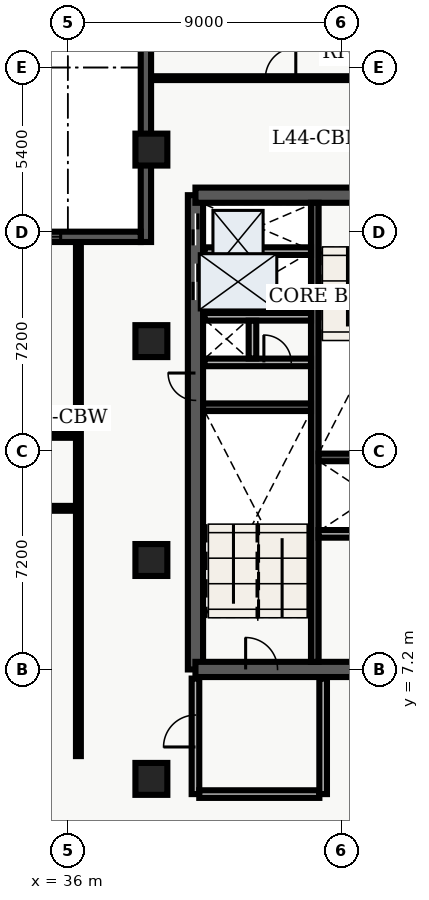
"""IFC4 building model, lengths in metres.
Left out: names, types, materials, properties, quantities, classifications, styles, units other than length and angle.
Written with IfcOpenShell. Run it as: python <this file> out.ifc"""

import sys

from ifc_helpers import new_model, entity, si_unit, converted_unit, direction, frame, origin_with_axes, origin_2d_with_axis, place, context, subcontext, project, spatial, polyline, rectangle, outline, extrude, element, fill, save


model = new_model("IFC4")
c1 = context("Model", 3, precision=1e-05, world=origin_with_axes(), true_north=direction((0.0, 1.0)))
c2 = subcontext(c1, "Body", "Model", "MODEL_VIEW")
j1 = project(units=[si_unit("LENGTHUNIT", "METRE"), converted_unit("PLANEANGLEUNIT", "DEGREE", entity("IfcPlaneAngleMeasure", 0.017), si_unit("PLANEANGLEUNIT", "RADIAN"), dimensions=[0, 0, 0, 0, 0, 0, 0])], contexts=[c1])
p1 = place(None, origin_with_axes())
s1 = spatial("IfcSite", under=j1, at=p1, CompositionType="ELEMENT")
p2 = place(p1, origin_with_axes())
s2 = spatial("IfcBuilding", under=s1, at=p2, CompositionType="ELEMENT")
p3 = place(p2, frame((0.0, 0.0, 179.7), z_axis=(0.0, 0.0, 1.0), x_axis=(1.0, 0.0, 0.0)))
s3 = spatial("IfcBuildingStorey", under=s2, at=p3, CompositionType="ELEMENT", Elevation=179.7)
p4 = place(p3, frame((40.2, 7.2, 0.0), z_axis=(0.0, 0.0, 1.0), x_axis=(0.0, 1.0, 0.0)))
e1 = element("IfcWall", 1, at=p4, inside=s3, PredefinedType="SHEAR", context=c2, shape_type="SweptSolid", body=[
    extrude(outline(polyline([(0.0, -0.25), (15.6, -0.25), (15.6, 0.25), (0.0, 0.25), (0.0, -0.25)])), origin_with_axes(), (0.0, 0.0, 1.0), 3.66),
])
p5 = place(p4, frame((14.475, 0.0, 0.0), z_axis=(0.0, 0.0, 1.0), x_axis=(1.0, 0.0, 0.0)))
e2 = element("IfcOpeningElement", 2, at=p5, cuts=e1, PredefinedType="OPENING", context=c2, shape_type="SweptSolid", body=[
    extrude(rectangle(XDim=1.05, YDim=0.52, at=origin_2d_with_axis()), origin_with_axes(), (0.0, 0.0, 1.0), 2.15),
])
p6 = place(p4, frame((12.75, 0.0, 0.0), z_axis=(0.0, 0.0, 1.0), x_axis=(1.0, 0.0, 0.0)))
e3 = element("IfcOpeningElement", 3, at=p6, cuts=e1, PredefinedType="OPENING", context=c2, shape_type="SweptSolid", body=[
    extrude(rectangle(XDim=1.2, YDim=0.52, at=origin_2d_with_axis()), origin_with_axes(), (0.0, 0.0, 1.0), 2.15),
])
p7 = place(p4, frame((9.3, 0.0, 0.0), z_axis=(0.0, 0.0, 1.0), x_axis=(1.0, 0.0, 0.0)))
e4 = element("IfcOpeningElement", 4, at=p7, cuts=e1, PredefinedType="OPENING", context=c2, shape_type="SweptSolid", body=[
    extrude(rectangle(XDim=0.9, YDim=0.52, at=origin_2d_with_axis()), origin_with_axes(), (0.0, 0.0, 1.0), 2.15),
])
p8 = place(p3, frame((40.2, 7.2, 0.0), z_axis=(0.0, 0.0, 1.0), x_axis=(1.0, 0.0, 0.0)))
e5 = element("IfcWall", 5, at=p8, inside=s3, PredefinedType="SHEAR", context=c2, shape_type="SweptSolid", body=[
    extrude(outline(polyline([(0.0, -0.25), (7.85, -0.25), (7.85, 0.25), (0.0, 0.25), (0.0, -0.25)])), origin_with_axes(), (0.0, 0.0, 1.0), 3.66),
])
p9 = place(p8, frame((2.175, 0.0, 0.0), z_axis=(0.0, 0.0, 1.0), x_axis=(1.0, 0.0, 0.0)))
e6 = element("IfcOpeningElement", 6, at=p9, cuts=e5, PredefinedType="OPENING", context=c2, shape_type="SweptSolid", body=[
    extrude(rectangle(XDim=1.05, YDim=0.52, at=origin_2d_with_axis()), origin_with_axes(), (0.0, 0.0, 1.0), 2.15),
])
p10 = place(p3, frame((40.2, 22.8, 0.0), z_axis=(0.0, 0.0, 1.0), x_axis=(1.0, 0.0, 0.0)))
e7 = element("IfcWall", 7, at=p10, inside=s3, PredefinedType="SHEAR", context=c2, shape_type="SweptSolid", body=[
    extrude(outline(polyline([(0.0, -0.25), (7.85, -0.25), (7.85, 0.25), (0.0, 0.25), (0.0, -0.25)])), origin_with_axes(), (0.0, 0.0, 1.0), 3.66),
])
p11 = place(p10, frame((5.775, 0.0, 0.0), z_axis=(0.0, 0.0, 1.0), x_axis=(1.0, 0.0, 0.0)))
e8 = element("IfcOpeningElement", 8, at=p11, cuts=e7, PredefinedType="OPENING", context=c2, shape_type="SweptSolid", body=[
    extrude(rectangle(XDim=1.05, YDim=0.52, at=origin_2d_with_axis()), origin_with_axes(), (0.0, 0.0, 1.0), 2.15),
])
p12 = place(p3, frame((44.125, 7.45, 0.0), z_axis=(0.0, 0.0, 1.0), x_axis=(0.0, 1.0, 0.0)))
e9 = element("IfcWall", 9, at=p12, inside=s3, PredefinedType="SHEAR", context=c2, shape_type="SweptSolid", body=[
    extrude(outline(polyline([(0.0, -0.125), (15.1, -0.125), (15.1, 0.125), (0.0, 0.125), (0.0, -0.125)])), origin_with_axes(), (0.0, 0.0, 1.0), 3.66),
])
for number, where, z_axis, x_axis in (
    (10, (40.45, 15.825, 0.0), (0.0, 0.0, 1.0), (1.0, 0.0, 0.0)),
    (11, (44.25, 14.175, 0.0), (0.0, 0.0, 1.0), (1.0, 0.0, 0.0)),
):
    element("IfcWall", number, at=place(p3, frame(where, z_axis=z_axis, x_axis=x_axis)), inside=s3, PredefinedType="SHEAR", context=c2, shape_type="SweptSolid", body=[
        extrude(outline(polyline([(0.0, -0.125), (3.55, -0.125), (3.55, 0.125), (0.0, 0.125), (0.0, -0.125)])), origin_with_axes(), (0.0, 0.0, 1.0), 3.66),
    ])
p13 = place(p3, frame((40.5, 17.3, 0.0), z_axis=(0.0, 0.0, 1.0), x_axis=(1.0, 0.0, 0.0)))
e12 = element("IfcWall", 12, at=p13, inside=s3, PredefinedType="SOLIDWALL", context=c2, shape_type="SweptSolid", body=[
    extrude(outline(polyline([(0.0, -0.125), (3.5, -0.125), (3.5, 0.125), (0.0, 0.125), (0.0, -0.125)])), origin_with_axes(), (0.0, 0.0, 1.0), 2.7),
])
p14 = place(p13, frame((2.4, 0.0, 0.0), z_axis=(0.0, 0.0, 1.0), x_axis=(1.0, 0.0, 0.0)))
e13 = element("IfcOpeningElement", 13, at=p14, cuts=e12, PredefinedType="OPENING", context=c2, shape_type="SweptSolid", body=[
    extrude(rectangle(XDim=0.9, YDim=0.27, at=origin_2d_with_axis()), origin_with_axes(), (0.0, 0.0, 1.0), 2.15),
])
p15 = place(p3, frame((40.5, 18.8, 0.0), z_axis=(0.0, 0.0, 1.0), x_axis=(1.0, 0.0, 0.0)))
e14 = element("IfcWall", 14, at=p15, inside=s3, PredefinedType="SOLIDWALL", context=c2, shape_type="SweptSolid", body=[
    extrude(outline(polyline([(0.0, -0.125), (3.5, -0.125), (3.5, 0.125), (0.0, 0.125), (0.0, -0.125)])), origin_with_axes(), (0.0, 0.0, 1.0), 2.7),
])
p16 = place(p3, frame((42.075, 17.43, 0.0), z_axis=(0.0, 0.0, 1.0), x_axis=(0.0, 1.0, 0.0)))
e15 = element("IfcWall", 15, at=p16, inside=s3, PredefinedType="SOLIDWALL", context=c2, shape_type="SweptSolid", body=[
    extrude(outline(polyline([(0.0, -0.125), (1.24, -0.125), (1.24, 0.125), (0.0, 0.125), (0.0, -0.125)])), origin_with_axes(), (0.0, 0.0, 1.0), 2.7),
])
p17 = place(p3, frame((40.2, 3.1, 0.0), z_axis=(0.0, 0.0, 1.0), x_axis=(0.0, 1.0, 0.0)))
e16 = element("IfcWall", 16, at=p17, inside=s3, PredefinedType="SOLIDWALL", context=c2, shape_type="SweptSolid", body=[
    extrude(outline(polyline([(0.0, -0.125), (3.8, -0.125), (3.8, 0.125), (0.0, 0.125), (0.0, -0.125)])), origin_with_axes(), (0.0, 0.0, 1.0), 2.7),
])
p18 = place(p17, frame((2.075, 0.0, 0.0), z_axis=(0.0, 0.0, 1.0), x_axis=(1.0, 0.0, 0.0)))
e17 = element("IfcOpeningElement", 17, at=p18, cuts=e16, PredefinedType="OPENING", context=c2, shape_type="SweptSolid", body=[
    extrude(rectangle(XDim=1.05, YDim=0.27, at=origin_2d_with_axis()), origin_with_axes(), (0.0, 0.0, 1.0), 2.15),
])
p19 = place(p3, frame((40.325, 3.1, 0.0), z_axis=(0.0, 0.0, 1.0), x_axis=(1.0, 0.0, 0.0)))
e18 = element("IfcWall", 18, at=p19, inside=s3, PredefinedType="SOLIDWALL", context=c2, shape_type="SweptSolid", body=[
    extrude(outline(polyline([(0.0, -0.125), (3.95, -0.125), (3.95, 0.125), (0.0, 0.125), (0.0, -0.125)])), origin_with_axes(), (0.0, 0.0, 1.0), 2.7),
])
p20 = place(p3, frame((44.4, 3.1, 0.0), z_axis=(0.0, 0.0, 1.0), x_axis=(0.0, 1.0, 0.0)))
e19 = element("IfcWall", 19, at=p20, inside=s3, PredefinedType="SOLIDWALL", context=c2, shape_type="SweptSolid", body=[
    extrude(outline(polyline([(0.0, -0.125), (3.8, -0.125), (3.8, 0.125), (0.0, 0.125), (0.0, -0.125)])), origin_with_axes(), (0.0, 0.0, 1.0), 2.7),
])
for number, where, z_axis, x_axis in (
    (20, (38.75, 3.6, 0.0), (0.0, 0.0, 1.0), (1.0, 0.0, 0.0)),
    (21, (38.75, 10.8, 0.0), (0.0, 0.0, 1.0), (1.0, 0.0, 0.0)),
    (22, (38.75, 18.0, 0.0), (0.0, 0.0, 1.0), (1.0, 0.0, 0.0)),
    (23, (38.75, 24.3, 0.0), (0.0, 0.0, 1.0), (1.0, 0.0, 0.0)),
):
    element("IfcColumn", number, at=place(p3, frame(where, z_axis=z_axis, x_axis=x_axis)), inside=s3, PredefinedType="COLUMN", context=c2, shape_type="SweptSolid", body=[
        extrude(rectangle(XDim=1.05, YDim=1.05, at=origin_2d_with_axis()), origin_with_axes(), (0.0, 0.0, 1.0), 3.9),
    ])
for number, where, z_axis, x_axis in (
    (24, (40.5, 20.96, 0.0), (0.0, 0.0, 1.0), (1.0, 0.0, 0.0)),
    (25, (44.25, 11.66, 0.0), (0.0, 0.0, 1.0), (1.0, 0.0, 0.0)),
):
    element("IfcWall", number, at=place(p3, frame(where, z_axis=z_axis, x_axis=x_axis)), inside=s3, PredefinedType="SOLIDWALL", context=c2, shape_type="SweptSolid", body=[
        extrude(outline(polyline([(0.0, -0.125), (3.5, -0.125), (3.5, 0.125), (0.0, 0.125), (0.0, -0.125)])), origin_with_axes(), (0.0, 0.0, 1.0), 2.7),
    ])
p21 = place(p3, frame((21.15, 12.5, 0.0), z_axis=(0.0, 0.0, 1.0), x_axis=(1.0, 0.0, 0.0)))
e26 = element("IfcWall", 26, at=p21, inside=s3, PredefinedType="PARTITIONING", context=c2, shape_type="SweptSolid", body=[
    extrude(outline(polyline([(0.0, -0.08), (15.2, -0.08), (15.2, 0.08), (0.0, 0.08), (0.0, -0.08)])), origin_with_axes(), (0.0, 0.0, 1.0), 2.7),
])
p22 = place(p21, frame((1.761, 0.0, 0.0), z_axis=(0.0, 0.0, 1.0), x_axis=(1.0, 0.0, 0.0)))
e27 = element("IfcOpeningElement", 27, at=p22, cuts=e26, PredefinedType="OPENING", context=c2, shape_type="SweptSolid", body=[
    extrude(rectangle(XDim=1.0, YDim=0.18, at=origin_2d_with_axis()), origin_with_axes(), (0.0, 0.0, 1.0), 2.15),
])
p23 = place(p21, frame((4.896, 0.0, 0.0), z_axis=(0.0, 0.0, 1.0), x_axis=(1.0, 0.0, 0.0)))
e28 = element("IfcOpeningElement", 28, at=p23, cuts=e26, PredefinedType="OPENING", context=c2, shape_type="SweptSolid", body=[
    extrude(rectangle(XDim=1.0, YDim=0.18, at=origin_2d_with_axis()), origin_with_axes(), (0.0, 0.0, 1.0), 2.15),
])
p24 = place(p21, frame((8.536, 0.0, 0.0), z_axis=(0.0, 0.0, 1.0), x_axis=(1.0, 0.0, 0.0)))
e29 = element("IfcOpeningElement", 29, at=p24, cuts=e26, PredefinedType="OPENING", context=c2, shape_type="SweptSolid", body=[
    extrude(rectangle(XDim=1.0, YDim=0.18, at=origin_2d_with_axis()), origin_with_axes(), (0.0, 0.0, 1.0), 2.15),
])
p25 = place(p21, frame((12.871, 0.0, 0.0), z_axis=(0.0, 0.0, 1.0), x_axis=(1.0, 0.0, 0.0)))
e30 = element("IfcOpeningElement", 30, at=p25, cuts=e26, PredefinedType="OPENING", context=c2, shape_type="SweptSolid", body=[
    extrude(rectangle(XDim=1.0, YDim=0.18, at=origin_2d_with_axis()), origin_with_axes(), (0.0, 0.0, 1.0), 2.15),
])
p26 = place(p3, frame((21.15, 14.9, 0.0), z_axis=(0.0, 0.0, 1.0), x_axis=(1.0, 0.0, 0.0)))
e31 = element("IfcWall", 31, at=p26, inside=s3, PredefinedType="PARTITIONING", context=c2, shape_type="SweptSolid", body=[
    extrude(outline(polyline([(0.0, -0.08), (15.2, -0.08), (15.2, 0.08), (0.0, 0.08), (0.0, -0.08)])), origin_with_axes(), (0.0, 0.0, 1.0), 2.7),
])
p27 = place(p26, frame((7.65, 0.0, 0.0), z_axis=(0.0, 0.0, 1.0), x_axis=(1.0, 0.0, 0.0)))
e32 = element("IfcOpeningElement", 32, at=p27, cuts=e31, PredefinedType="OPENING", context=c2, shape_type="SweptSolid", body=[
    extrude(rectangle(XDim=1.0, YDim=0.18, at=origin_2d_with_axis()), origin_with_axes(), (0.0, 0.0, 1.0), 2.15),
])
p28 = place(p3, frame((36.35, 4.35, 0.0), z_axis=(0.0, 0.0, 1.0), x_axis=(0.0, 1.0, 0.0)))
e33 = element("IfcWall", 33, at=p28, inside=s3, PredefinedType="PARTITIONING", context=c2, shape_type="SweptSolid", body=[
    extrude(outline(polyline([(0.0, -0.08), (16.95, -0.08), (16.95, 0.08), (0.0, 0.08), (0.0, -0.08)])), origin_with_axes(), (0.0, 0.0, 1.0), 2.7),
])
p29 = place(p3, frame((38.735, 26.65, 0.0), z_axis=(0.0, 0.0, 1.0), x_axis=(1.0, 0.0, 0.0)))
e34 = element("IfcWall", 34, at=p29, inside=s3, PredefinedType="PARTITIONING", context=c2, shape_type="SweptSolid", body=[
    extrude(outline(polyline([(0.0, -0.062), (20.905, -0.062), (20.905, 0.062), (0.0, 0.062), (0.0, -0.062)])), origin_with_axes(), (0.0, 0.0, 1.0), 2.7),
])
p30 = place(p29, frame((4.265, 0.0, 0.0), z_axis=(0.0, 0.0, 1.0), x_axis=(1.0, 0.0, 0.0)))
e35 = element("IfcOpeningElement", 35, at=p30, cuts=e34, PredefinedType="OPENING", context=c2, shape_type="SweptSolid", body=[
    extrude(rectangle(XDim=1.0, YDim=0.145, at=origin_2d_with_axis()), origin_with_axes(), (0.0, 0.0, 1.0), 2.15),
])
p31 = place(p3, frame((38.57, 21.26, 0.0), z_axis=(0.0, 0.0, 1.0), x_axis=(0.0, 1.0, 0.0)))
e36 = element("IfcWall", 36, at=p31, inside=s3, PredefinedType="SOLIDWALL", context=c2, shape_type="SweptSolid", body=[
    extrude(outline(polyline([(0.0, -0.17), (7.54, -0.17), (7.54, 0.17), (0.0, 0.17), (0.0, -0.17)])), origin_with_axes(), (0.0, 0.0, 1.0), 3.66),
])
p32 = place(p3, frame((25.465, 21.43, 0.0), z_axis=(0.0, 0.0, 1.0), x_axis=(1.0, 0.0, 0.0)))
e37 = element("IfcWall", 37, at=p32, inside=s3, PredefinedType="SOLIDWALL", context=c2, shape_type="SweptSolid", body=[
    extrude(outline(polyline([(0.0, -0.17), (12.935, -0.17), (12.935, 0.17), (0.0, 0.17), (0.0, -0.17)])), origin_with_axes(), (0.0, 0.0, 1.0), 3.66),
])
p33 = place(p32, frame((3.534, 0.0, 0.45), z_axis=(0.0, 0.0, 1.0), x_axis=(1.0, 0.0, 0.0)))
e38 = element("IfcOpeningElement", 38, at=p33, cuts=e37, PredefinedType="OPENING", context=c2, shape_type="SweptSolid", body=[
    extrude(rectangle(XDim=1.8, YDim=0.36, at=origin_2d_with_axis()), origin_with_axes(), (0.0, 0.0, 1.0), 2.1),
])
p34 = place(p32, frame((9.401, 0.0, 0.45), z_axis=(0.0, 0.0, 1.0), x_axis=(1.0, 0.0, 0.0)))
e39 = element("IfcOpeningElement", 39, at=p34, cuts=e37, PredefinedType="OPENING", context=c2, shape_type="SweptSolid", body=[
    extrude(rectangle(XDim=1.8, YDim=0.36, at=origin_2d_with_axis()), origin_with_axes(), (0.0, 0.0, 1.0), 2.1),
])
p35 = place(p4, frame((14.475, 0.0, 0.0), z_axis=(0.0, 0.0, 1.0), x_axis=(1.0, 0.0, 0.0)))
e40 = element("IfcDoor", 40, at=p35, inside=s3, OperationType="SLIDING_TO_RIGHT", PredefinedType="DOOR", context=c2, shape_type="SweptSolid", body=[
    extrude(rectangle(XDim=1.05, YDim=0.09, at=origin_2d_with_axis()), origin_with_axes(), (0.0, 0.0, 1.0), 2.15),
])
fill(e2, e40)
p36 = place(p4, frame((12.75, 0.0, 0.0), z_axis=(0.0, 0.0, 1.0), x_axis=(1.0, 0.0, 0.0)))
e41 = element("IfcDoor", 41, at=p36, inside=s3, OperationType="DOUBLE_DOOR_SLIDING", PredefinedType="DOOR", context=c2, shape_type="SweptSolid", body=[
    extrude(rectangle(XDim=1.2, YDim=0.09, at=origin_2d_with_axis()), origin_with_axes(), (0.0, 0.0, 1.0), 2.15),
])
fill(e3, e41)
p37 = place(p4, frame((9.3, 0.0, 0.0), z_axis=(0.0, 0.0, 1.0), x_axis=(1.0, 0.0, 0.0)))
e42 = element("IfcDoor", 42, at=p37, inside=s3, OperationType="SINGLE_SWING_RIGHT", PredefinedType="DOOR", context=c2, shape_type="SweptSolid", body=[
    extrude(rectangle(XDim=0.9, YDim=0.09, at=origin_2d_with_axis()), origin_with_axes(), (0.0, 0.0, 1.0), 2.15),
])
fill(e4, e42)
p38 = place(p13, frame((2.4, 0.0, 0.0), z_axis=(0.0, 0.0, 1.0), x_axis=(1.0, 0.0, 0.0)))
e43 = element("IfcDoor", 43, at=p38, inside=s3, OperationType="SINGLE_SWING_LEFT", PredefinedType="DOOR", context=c2, shape_type="SweptSolid", body=[
    extrude(rectangle(XDim=0.9, YDim=0.09, at=origin_2d_with_axis()), origin_with_axes(), (0.0, 0.0, 1.0), 2.15),
])
fill(e13, e43)
p39 = place(p8, frame((2.175, 0.0, 0.0), z_axis=(0.0, 0.0, 1.0), x_axis=(1.0, 0.0, 0.0)))
e44 = element("IfcDoor", 44, at=p39, inside=s3, OperationType="SINGLE_SWING_LEFT", PredefinedType="DOOR", context=c2, shape_type="SweptSolid", body=[
    extrude(rectangle(XDim=1.05, YDim=0.09, at=origin_2d_with_axis()), origin_with_axes(), (0.0, 0.0, 1.0), 2.15),
])
fill(e6, e44)
p40 = place(p17, frame((2.075, 0.0, 0.0), z_axis=(0.0, 0.0, 1.0), x_axis=(1.0, 0.0, 0.0)))
e45 = element("IfcDoor", 45, at=p40, inside=s3, OperationType="SINGLE_SWING_LEFT", PredefinedType="DOOR", context=c2, shape_type="SweptSolid", body=[
    extrude(rectangle(XDim=1.05, YDim=0.09, at=origin_2d_with_axis()), origin_with_axes(), (0.0, 0.0, 1.0), 2.15),
])
fill(e17, e45)
p41 = place(p29, frame((4.265, 0.0, 0.0), z_axis=(0.0, 0.0, 1.0), x_axis=(1.0, 0.0, 0.0)))
e46 = element("IfcDoor", 46, at=p41, inside=s3, OperationType="SINGLE_SWING_RIGHT", PredefinedType="DOOR", context=c2, shape_type="SweptSolid", body=[
    extrude(rectangle(XDim=1.0, YDim=0.075, at=origin_2d_with_axis()), origin_with_axes(), (0.0, 0.0, 1.0), 2.15),
])
fill(e35, e46)
p42 = place(p32, frame((9.401, 0.0, 0.45), z_axis=(0.0, 0.0, 1.0), x_axis=(1.0, 0.0, 0.0)))
e47 = element("IfcWindow", 47, at=p42, inside=s3, PredefinedType="WINDOW", context=c2, shape_type="SweptSolid", body=[
    extrude(rectangle(XDim=1.8, YDim=0.09, at=origin_2d_with_axis()), origin_with_axes(), (0.0, 0.0, 1.0), 2.1),
])
fill(e39, e47)
save(model, sys.argv[1])
